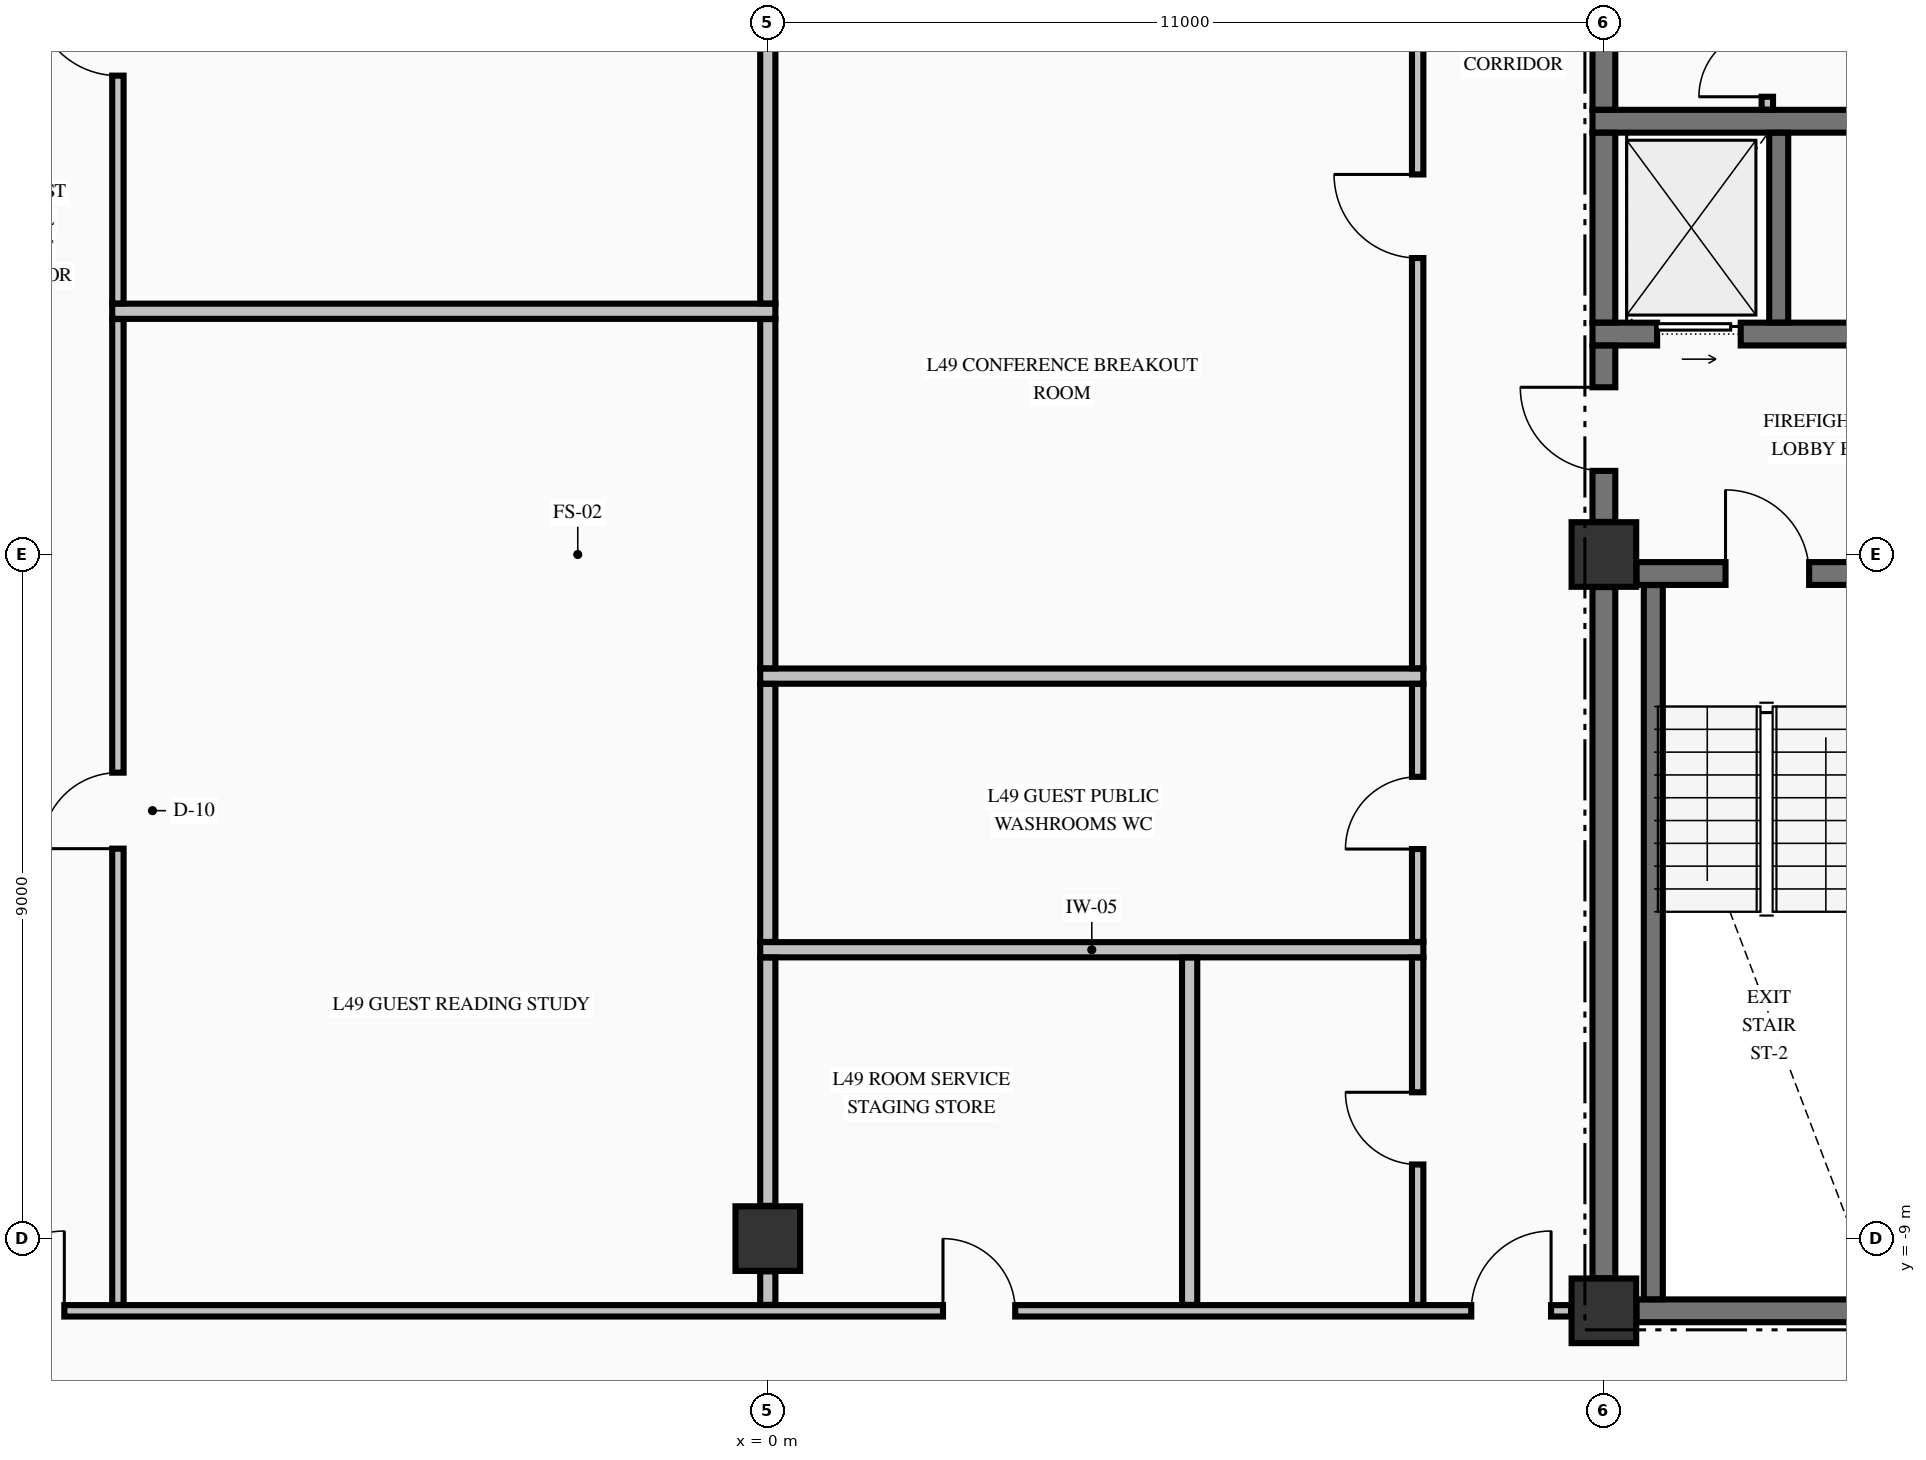
"""IFC4 building model, lengths in metres.
Left out: names, types, materials, properties, quantities, classifications, styles, units other than length and angle.
Written with IfcOpenShell. Run it as: python <this file> out.ifc"""

import sys

from ifc_helpers import new_model, si_unit, direction, frame, frame_2d, origin, origin_2d, place, context, subcontext, project, spatial, rectangle, extrude, element, fill, save


model = new_model("IFC4")
c1 = context("Model", 3, precision=1e-05, world=origin(), true_north=direction((0.0, 1.0)))
c2 = subcontext(c1, "Body", "Model", "MODEL_VIEW")
j1 = project(units=[si_unit("LENGTHUNIT", "METRE"), si_unit("PLANEANGLEUNIT", "RADIAN")], contexts=[c1])
p1 = place(None, origin())
s1 = spatial("IfcSite", under=j1, at=p1, CompositionType="ELEMENT")
p2 = place(p1, origin())
s2 = spatial("IfcBuilding", under=s1, at=p2, CompositionType="ELEMENT")
p3 = place(p2, frame((0.0, 0.0, 191.46)))
s3 = spatial("IfcBuildingStorey", under=s2, at=p3, CompositionType="ELEMENT", Elevation=191.46)
for number, where, z_axis, x_axis in (
    (1, (11.0, -9.95, -0.425), (0.0, 0.0, 1.0), (1.0, 0.0, 0.0)),
    (2, (11.0, 0.0, -0.425), (0.0, 0.0, 1.0), (1.0, 0.0, 0.0)),
    (3, (0.0, -9.0, -0.425), (0.0, 0.0, 1.0), (1.0, 0.0, 0.0)),
):
    element("IfcColumn", number, at=place(p3, frame(where, z_axis=z_axis, x_axis=x_axis)), inside=s3, PredefinedType="COLUMN", context=c2, shape_type="SweptSolid", body=[
        extrude(rectangle(XDim=0.85, YDim=0.85, at=origin_2d()), origin(), (0.0, 0.0, 1.0), 3.55),
    ])
p4 = place(p3, frame((11.429, -9.95, 0.0), z_axis=(0.0, 0.0, 1.0), x_axis=(1.0, 0.0, 0.0)))
e4 = element("IfcWall", 4, at=p4, inside=s3, PredefinedType="SHEAR", context=c2, shape_type="SweptSolid", body=[
    extrude(rectangle(XDim=3.271, YDim=0.3, at=frame_2d((1.635, 0.0))), origin(), (0.0, 0.0, 1.0), 3.125),
])
p5 = place(p3, frame((11.429, -0.25, 0.0), z_axis=(0.0, 0.0, 1.0), x_axis=(1.0, 0.0, 0.0)))
e5 = element("IfcWall", 5, at=p5, inside=s3, PredefinedType="SHEAR", context=c2, shape_type="SweptSolid", body=[
    extrude(rectangle(XDim=3.446, YDim=0.3, at=frame_2d((1.723, 0.0))), origin(), (0.0, 0.0, 1.0), 3.125),
])
p6 = place(p5, frame((1.171, 0.0, 0.0)))
e6 = element("IfcOpeningElement", 6, at=p6, cuts=e5, PredefinedType="OPENING", context=c2, shape_type="SweptSolid", body=[
    extrude(rectangle(XDim=1.1, YDim=2.15, at=frame_2d((0.55, 1.075))), frame((0.0, 0.16, 0.0), z_axis=(0.0, -1.0, 0.0), x_axis=(1.0, 0.0, 0.0)), (0.0, 0.0, 1.0), 0.32),
])
p7 = place(p3, frame((10.85, 2.9, 0.0), z_axis=(0.0, 0.0, 1.0), x_axis=(1.0, 0.0, 0.0)))
e7 = element("IfcWall", 7, at=p7, inside=s3, PredefinedType="SHEAR", context=c2, shape_type="SweptSolid", body=[
    extrude(rectangle(XDim=4.025, YDim=0.3, at=frame_2d((2.012, 0.0))), origin(), (0.0, 0.0, 1.0), 3.125),
])
p8 = place(p7, frame((0.85, 0.0, 0.0)))
e8 = element("IfcOpeningElement", 8, at=p8, cuts=e7, PredefinedType="OPENING", context=c2, shape_type="SweptSolid", body=[
    extrude(rectangle(XDim=1.1, YDim=2.2, at=frame_2d((0.55, 1.1))), frame((0.0, 0.16, 0.0), z_axis=(0.0, -1.0, 0.0), x_axis=(1.0, 0.0, 0.0)), (0.0, 0.0, 1.0), 0.32),
])
p9 = place(p3, frame((10.85, 5.7, 0.0), z_axis=(0.0, 0.0, 1.0), x_axis=(1.0, 0.0, 0.0)))
e9 = element("IfcWall", 9, at=p9, inside=s3, PredefinedType="SHEAR", context=c2, shape_type="SweptSolid", body=[
    extrude(rectangle(XDim=4.025, YDim=0.3, at=frame_2d((2.012, 0.0))), origin(), (0.0, 0.0, 1.0), 3.125),
])
p10 = place(p3, frame((-10.569, -9.95, 0.0), z_axis=(0.0, 0.0, 1.0), x_axis=(1.0, 0.0, 0.0)))
e10 = element("IfcWall", 10, at=p10, inside=s3, PredefinedType="PARTITIONING", context=c2, shape_type="SweptSolid", body=[
    extrude(rectangle(XDim=21.138, YDim=0.15, at=frame_2d((10.569, 0.0))), origin(), (0.0, 0.0, 1.0), 3.125),
])
p11 = place(p10, frame((0.264, 0.0, 0.0)))
e11 = element("IfcOpeningElement", 11, at=p11, cuts=e10, PredefinedType="OPENING", context=c2, shape_type="SweptSolid", body=[
    extrude(rectangle(XDim=1.05, YDim=2.15, at=frame_2d((0.525, 1.075))), frame((0.0, 0.085, 0.0), z_axis=(0.0, -1.0, 0.0), x_axis=(1.0, 0.0, 0.0)), (0.0, 0.0, 1.0), 0.17),
])
p12 = place(p10, frame((19.824, 0.0, 0.0)))
e12 = element("IfcOpeningElement", 12, at=p12, cuts=e10, PredefinedType="OPENING", context=c2, shape_type="SweptSolid", body=[
    extrude(rectangle(XDim=1.05, YDim=2.15, at=frame_2d((0.525, 1.075))), frame((0.0, 0.085, 0.0), z_axis=(0.0, -1.0, 0.0), x_axis=(1.0, 0.0, 0.0)), (0.0, 0.0, 1.0), 0.17),
])
p13 = place(p10, frame((12.874, 0.0, 0.0)))
e13 = element("IfcOpeningElement", 13, at=p13, cuts=e10, PredefinedType="OPENING", context=c2, shape_type="SweptSolid", body=[
    extrude(rectangle(XDim=0.95, YDim=2.15, at=frame_2d((0.475, 1.075))), frame((0.0, 0.085, 0.0), z_axis=(0.0, -1.0, 0.0), x_axis=(1.0, 0.0, 0.0)), (0.0, 0.0, 1.0), 0.17),
])
for number, where, z_axis, x_axis in (
    (14, (-0.1, -5.2, 0.0), (0.0, 0.0, 1.0), (1.0, 0.0, 0.0)),
    (15, (-0.1, -1.6, 0.0), (0.0, 0.0, 1.0), (1.0, 0.0, 0.0)),
    (16, (-8.625, 3.2, 0.0), (0.0, 0.0, 1.0), (1.0, 0.0, 0.0)),
):
    element("IfcWall", number, at=place(p3, frame(where, z_axis=z_axis, x_axis=x_axis)), inside=s3, PredefinedType="PARTITIONING", context=c2, shape_type="SweptSolid", body=[
        extrude(rectangle(XDim=8.725, YDim=0.2, at=frame_2d((4.363, 0.0))), origin(), (0.0, 0.0, 1.0), 3.125),
    ])
p14 = place(p3, frame((11.0, -9.521, 0.0), z_axis=(0.0, 0.0, 1.0), x_axis=(0.0, 1.0, 0.0)))
e17 = element("IfcWall", 17, at=p14, inside=s3, PredefinedType="SHEAR", context=c2, shape_type="SweptSolid", body=[
    extrude(rectangle(XDim=9.092, YDim=0.3, at=frame_2d((4.546, 0.0))), origin(), (0.0, 0.0, 1.0), 3.125),
])
p15 = place(p3, frame((11.0, 0.429, 0.0), z_axis=(0.0, 0.0, 1.0), x_axis=(0.0, 1.0, 0.0)))
e18 = element("IfcWall", 18, at=p15, inside=s3, PredefinedType="SHEAR", context=c2, shape_type="SweptSolid", body=[
    extrude(rectangle(XDim=2.319, YDim=0.3, at=frame_2d((1.16, 0.0))), origin(), (0.0, 0.0, 1.0), 3.125),
])
p16 = place(p15, frame((0.671, 0.0, 0.0)))
e19 = element("IfcOpeningElement", 19, at=p16, cuts=e18, PredefinedType="OPENING", context=c2, shape_type="SweptSolid", body=[
    extrude(rectangle(XDim=1.1, YDim=2.15, at=frame_2d((0.55, 1.075))), frame((0.0, 0.16, 0.0), z_axis=(0.0, -1.0, 0.0), x_axis=(1.0, 0.0, 0.0)), (0.0, 0.0, 1.0), 0.32),
])
p17 = place(p3, frame((11.0, 3.052, 0.0), z_axis=(0.0, 0.0, 1.0), x_axis=(0.0, 1.0, 0.0)))
e20 = element("IfcWall", 20, at=p17, inside=s3, PredefinedType="SHEAR", context=c2, shape_type="SweptSolid", body=[
    extrude(rectangle(XDim=2.496, YDim=0.3, at=frame_2d((1.248, 0.0))), origin(), (0.0, 0.0, 1.0), 3.125),
])
p18 = place(p3, frame((11.0, 5.852, 0.0), z_axis=(0.0, 0.0, 1.0), x_axis=(0.0, 1.0, 0.0)))
e21 = element("IfcWall", 21, at=p18, inside=s3, PredefinedType="SHEAR", context=c2, shape_type="SweptSolid", body=[
    extrude(rectangle(XDim=4.219, YDim=0.3, at=frame_2d((2.109, 0.0))), origin(), (0.0, 0.0, 1.0), 3.125),
])
p19 = place(p3, frame((11.65, -9.798, 0.0), z_axis=(0.0, 0.0, 1.0), x_axis=(0.0, 1.0, 0.0)))
e22 = element("IfcWall", 22, at=p19, inside=s3, PredefinedType="SOLIDWALL", context=c2, shape_type="SweptSolid", body=[
    extrude(rectangle(XDim=9.396, YDim=0.25, at=frame_2d((4.698, 0.0))), origin(), (0.0, 0.0, 1.0), 3.125),
])
p20 = place(p3, frame((13.3, 3.052, 0.0), z_axis=(0.0, 0.0, 1.0), x_axis=(0.0, 1.0, 0.0)))
e23 = element("IfcWall", 23, at=p20, inside=s3, PredefinedType="SOLIDWALL", context=c2, shape_type="SweptSolid", body=[
    extrude(rectangle(XDim=2.496, YDim=0.25, at=frame_2d((1.248, 0.0))), origin(), (0.0, 0.0, 1.0), 3.125),
])
p21 = place(p3, frame((-8.55, -9.872, 0.0), z_axis=(0.0, 0.0, 1.0), x_axis=(0.0, 1.0, 0.0)))
e24 = element("IfcWall", 24, at=p21, inside=s3, PredefinedType="PARTITIONING", context=c2, shape_type="SweptSolid", body=[
    extrude(rectangle(XDim=12.969, YDim=0.15, at=frame_2d((6.484, 0.0))), origin(), (0.0, 0.0, 1.0), 3.125),
])
p22 = place(p21, frame((6.002, 0.0, 0.0)))
e25 = element("IfcOpeningElement", 25, at=p22, cuts=e24, PredefinedType="OPENING", context=c2, shape_type="SweptSolid", body=[
    extrude(rectangle(XDim=1.0, YDim=2.15, at=frame_2d((0.5, 1.075))), frame((0.0, 0.085, 0.0), z_axis=(0.0, -1.0, 0.0), x_axis=(1.0, 0.0, 0.0)), (0.0, 0.0, 1.0), 0.17),
])
p23 = place(p3, frame((-8.55, 3.303, 0.0), z_axis=(0.0, 0.0, 1.0), x_axis=(0.0, 1.0, 0.0)))
e26 = element("IfcWall", 26, at=p23, inside=s3, PredefinedType="PARTITIONING", context=c2, shape_type="SweptSolid", body=[
    extrude(rectangle(XDim=7.119, YDim=0.15, at=frame_2d((3.56, 0.0))), origin(), (0.0, 0.0, 1.0), 3.125),
])
p24 = place(p23, frame((2.997, 0.0, 0.0)))
e27 = element("IfcOpeningElement", 27, at=p24, cuts=e26, PredefinedType="OPENING", context=c2, shape_type="SweptSolid", body=[
    extrude(rectangle(XDim=1.1, YDim=2.15, at=frame_2d((0.55, 1.075))), frame((0.0, 0.085, 0.0), z_axis=(0.0, -1.0, 0.0), x_axis=(1.0, 0.0, 0.0)), (0.0, 0.0, 1.0), 0.17),
])
p25 = place(p3, frame((0.0, -9.872, 0.0), z_axis=(0.0, 0.0, 1.0), x_axis=(0.0, 1.0, 0.0)))
e28 = element("IfcWall", 28, at=p25, inside=s3, PredefinedType="PARTITIONING", context=c2, shape_type="SweptSolid", body=[
    extrude(rectangle(XDim=0.441, YDim=0.2, at=frame_2d((0.221, 0.0))), origin(), (0.0, 0.0, 1.0), 2.317),
])
p26 = place(p3, frame((0.0, -8.569, 0.0), z_axis=(0.0, 0.0, 1.0), x_axis=(0.0, 1.0, 0.0)))
e29 = element("IfcWall", 29, at=p26, inside=s3, PredefinedType="PARTITIONING", context=c2, shape_type="SweptSolid", body=[
    extrude(rectangle(XDim=3.266, YDim=0.2, at=frame_2d((1.633, 0.0))), origin(), (0.0, 0.0, 1.0), 2.317),
])
p27 = place(p3, frame((0.0, -5.097, 0.0), z_axis=(0.0, 0.0, 1.0), x_axis=(0.0, 1.0, 0.0)))
e30 = element("IfcWall", 30, at=p27, inside=s3, PredefinedType="PARTITIONING", context=c2, shape_type="SweptSolid", body=[
    extrude(rectangle(XDim=3.394, YDim=0.2, at=frame_2d((1.697, 0.0))), origin(), (0.0, 0.0, 1.0), 2.317),
])
p28 = place(p3, frame((0.0, -1.497, 0.0), z_axis=(0.0, 0.0, 1.0), x_axis=(0.0, 1.0, 0.0)))
e31 = element("IfcWall", 31, at=p28, inside=s3, PredefinedType="PARTITIONING", context=c2, shape_type="SweptSolid", body=[
    extrude(rectangle(XDim=4.594, YDim=0.2, at=frame_2d((2.297, 0.0))), origin(), (0.0, 0.0, 1.0), 2.317),
])
p29 = place(p3, frame((0.0, 3.303, 0.0), z_axis=(0.0, 0.0, 1.0), x_axis=(0.0, 1.0, 0.0)))
e32 = element("IfcWall", 32, at=p29, inside=s3, PredefinedType="PARTITIONING", context=c2, shape_type="SweptSolid", body=[
    extrude(rectangle(XDim=5.266, YDim=0.2, at=frame_2d((2.633, 0.0))), origin(), (0.0, 0.0, 1.0), 2.317),
])
p30 = place(p3, frame((5.55, -9.872, 0.0), z_axis=(0.0, 0.0, 1.0), x_axis=(0.0, 1.0, 0.0)))
e33 = element("IfcWall", 33, at=p30, inside=s3, PredefinedType="PARTITIONING", context=c2, shape_type="SweptSolid", body=[
    extrude(rectangle(XDim=4.569, YDim=0.2, at=frame_2d((2.285, 0.0))), origin(), (0.0, 0.0, 1.0), 3.125),
])
p31 = place(p3, frame((8.55, -9.872, 0.0), z_axis=(0.0, 0.0, 1.0), x_axis=(0.0, 1.0, 0.0)))
e34 = element("IfcWall", 34, at=p31, inside=s3, PredefinedType="PARTITIONING", context=c2, shape_type="SweptSolid", body=[
    extrude(rectangle(XDim=4.569, YDim=0.15, at=frame_2d((2.285, 0.0))), origin(), (0.0, 0.0, 1.0), 3.125),
])
p32 = place(p31, frame((1.847, 0.0, 0.0)))
e35 = element("IfcOpeningElement", 35, at=p32, cuts=e34, PredefinedType="OPENING", context=c2, shape_type="SweptSolid", body=[
    extrude(rectangle(XDim=0.95, YDim=2.15, at=frame_2d((0.475, 1.075))), frame((0.0, 0.085, 0.0), z_axis=(0.0, -1.0, 0.0), x_axis=(1.0, 0.0, 0.0)), (0.0, 0.0, 1.0), 0.17),
])
p33 = place(p3, frame((8.55, -5.097, 0.0), z_axis=(0.0, 0.0, 1.0), x_axis=(0.0, 1.0, 0.0)))
e36 = element("IfcWall", 36, at=p33, inside=s3, PredefinedType="PARTITIONING", context=c2, shape_type="SweptSolid", body=[
    extrude(rectangle(XDim=3.394, YDim=0.15, at=frame_2d((1.697, 0.0))), origin(), (0.0, 0.0, 1.0), 3.125),
])
p34 = place(p33, frame((1.222, 0.0, 0.0)))
e37 = element("IfcOpeningElement", 37, at=p34, cuts=e36, PredefinedType="OPENING", context=c2, shape_type="SweptSolid", body=[
    extrude(rectangle(XDim=0.95, YDim=2.15, at=frame_2d((0.475, 1.075))), frame((0.0, 0.085, 0.0), z_axis=(0.0, -1.0, 0.0), x_axis=(1.0, 0.0, 0.0)), (0.0, 0.0, 1.0), 0.17),
])
p35 = place(p3, frame((8.55, -1.497, 0.0), z_axis=(0.0, 0.0, 1.0), x_axis=(0.0, 1.0, 0.0)))
e38 = element("IfcWall", 38, at=p35, inside=s3, PredefinedType="PARTITIONING", context=c2, shape_type="SweptSolid", body=[
    extrude(rectangle(XDim=11.919, YDim=0.15, at=frame_2d((5.959, 0.0))), origin(), (0.0, 0.0, 1.0), 3.125),
])
p36 = place(p35, frame((5.397, 0.0, 0.0)))
e39 = element("IfcOpeningElement", 39, at=p36, cuts=e38, PredefinedType="OPENING", context=c2, shape_type="SweptSolid", body=[
    extrude(rectangle(XDim=1.1, YDim=2.15, at=frame_2d((0.55, 1.075))), frame((0.0, 0.085, 0.0), z_axis=(0.0, -1.0, 0.0), x_axis=(1.0, 0.0, 0.0)), (0.0, 0.0, 1.0), 0.17),
])
p37 = place(p3, frame((13.15, 5.853, 0.0), z_axis=(0.0, 0.0, 1.0), x_axis=(0.0, 1.0, 0.0)))
e40 = element("IfcWall", 40, at=p37, inside=s3, PredefinedType="PARTITIONING", context=c2, shape_type="SweptSolid", body=[
    extrude(rectangle(XDim=1.219, YDim=0.15, at=frame_2d((0.609, 0.0))), origin(), (0.0, 0.0, 1.0), 3.125),
])
p38 = place(p37, frame((0.169, 0.0, 0.0)))
e41 = element("IfcOpeningElement", 41, at=p38, cuts=e40, PredefinedType="OPENING", context=c2, shape_type="SweptSolid", body=[
    extrude(rectangle(XDim=0.9, YDim=2.15, at=frame_2d((0.45, 1.075))), frame((0.0, 0.085, 0.0), z_axis=(0.0, -1.0, 0.0), x_axis=(1.0, 0.0, 0.0)), (0.0, 0.0, 1.0), 0.17),
])
p39 = place(p6, origin())
e42 = element("IfcDoor", 42, at=p39, inside=s3, OperationType="SINGLE_SWING_LEFT", PredefinedType="DOOR", context=c2, shape_type="SweptSolid", body=[
    extrude(rectangle(XDim=1.1, YDim=2.15, at=frame_2d((0.55, 1.075))), frame((0.0, 0.025, 0.0), z_axis=(0.0, -1.0, 0.0), x_axis=(1.0, 0.0, 0.0)), (0.0, 0.0, 1.0), 0.05),
])
fill(e6, e42)
p40 = place(p16, origin())
e43 = element("IfcDoor", 43, at=p40, inside=s3, OperationType="SINGLE_SWING_RIGHT", PredefinedType="DOOR", context=c2, shape_type="SweptSolid", body=[
    extrude(rectangle(XDim=1.1, YDim=2.15, at=frame_2d((0.55, 1.075))), frame((0.0, 0.025, 0.0), z_axis=(0.0, -1.0, 0.0), x_axis=(1.0, 0.0, 0.0)), (0.0, 0.0, 1.0), 0.05),
])
fill(e19, e43)
p41 = place(p8, origin())
e44 = element("IfcDoor", 44, at=p41, inside=s3, OperationType="SLIDING_TO_RIGHT", PredefinedType="DOOR", context=c2, shape_type="SweptSolid", body=[
    extrude(rectangle(XDim=1.1, YDim=2.2, at=frame_2d((0.55, 1.1))), frame((0.0, 0.025, 0.0), z_axis=(0.0, -1.0, 0.0), x_axis=(1.0, 0.0, 0.0)), (0.0, 0.0, 1.0), 0.05),
])
fill(e8, e44)
p42 = place(p38, origin())
e45 = element("IfcDoor", 45, at=p42, inside=s3, OperationType="SINGLE_SWING_LEFT", PredefinedType="DOOR", context=c2, shape_type="SweptSolid", body=[
    extrude(rectangle(XDim=0.9, YDim=2.15, at=frame_2d((0.45, 1.075))), frame((0.0, 0.025, 0.0), z_axis=(0.0, -1.0, 0.0), x_axis=(1.0, 0.0, 0.0)), (0.0, 0.0, 1.0), 0.05),
])
fill(e41, e45)
p43 = place(p11, origin())
e46 = element("IfcDoor", 46, at=p43, inside=s3, OperationType="SINGLE_SWING_RIGHT", PredefinedType="DOOR", context=c2, shape_type="SweptSolid", body=[
    extrude(rectangle(XDim=1.05, YDim=2.15, at=frame_2d((0.525, 1.075))), frame((0.0, 0.025, 0.0), z_axis=(0.0, -1.0, 0.0), x_axis=(1.0, 0.0, 0.0)), (0.0, 0.0, 1.0), 0.05),
])
fill(e11, e46)
p44 = place(p12, origin())
e47 = element("IfcDoor", 47, at=p44, inside=s3, OperationType="SINGLE_SWING_RIGHT", PredefinedType="DOOR", context=c2, shape_type="SweptSolid", body=[
    extrude(rectangle(XDim=1.05, YDim=2.15, at=frame_2d((0.525, 1.075))), frame((0.0, 0.025, 0.0), z_axis=(0.0, -1.0, 0.0), x_axis=(1.0, 0.0, 0.0)), (0.0, 0.0, 1.0), 0.05),
])
fill(e12, e47)
p45 = place(p24, origin())
e48 = element("IfcDoor", 48, at=p45, inside=s3, OperationType="SINGLE_SWING_RIGHT", PredefinedType="DOOR", context=c2, shape_type="SweptSolid", body=[
    extrude(rectangle(XDim=1.1, YDim=2.15, at=frame_2d((0.55, 1.075))), frame((0.0, 0.025, 0.0), z_axis=(0.0, -1.0, 0.0), x_axis=(1.0, 0.0, 0.0)), (0.0, 0.0, 1.0), 0.05),
])
fill(e27, e48)
p46 = place(p22, origin())
e49 = element("IfcDoor", 49, at=p46, inside=s3, OperationType="SINGLE_SWING_LEFT", PredefinedType="DOOR", context=c2, shape_type="SweptSolid", body=[
    extrude(rectangle(XDim=1.0, YDim=2.15, at=frame_2d((0.5, 1.075))), frame((0.0, 0.025, 0.0), z_axis=(0.0, -1.0, 0.0), x_axis=(1.0, 0.0, 0.0)), (0.0, 0.0, 1.0), 0.05),
])
fill(e25, e49)
p47 = place(p36, origin())
e50 = element("IfcDoor", 50, at=p47, inside=s3, OperationType="SINGLE_SWING_RIGHT", PredefinedType="DOOR", context=c2, shape_type="SweptSolid", body=[
    extrude(rectangle(XDim=1.1, YDim=2.15, at=frame_2d((0.55, 1.075))), frame((0.0, 0.025, 0.0), z_axis=(0.0, -1.0, 0.0), x_axis=(1.0, 0.0, 0.0)), (0.0, 0.0, 1.0), 0.05),
])
fill(e39, e50)
p48 = place(p34, origin())
e51 = element("IfcDoor", 51, at=p48, inside=s3, OperationType="SINGLE_SWING_LEFT", PredefinedType="DOOR", context=c2, shape_type="SweptSolid", body=[
    extrude(rectangle(XDim=0.95, YDim=2.15, at=frame_2d((0.475, 1.075))), frame((0.0, 0.025, 0.0), z_axis=(0.0, -1.0, 0.0), x_axis=(1.0, 0.0, 0.0)), (0.0, 0.0, 1.0), 0.05),
])
fill(e37, e51)
p49 = place(p32, origin())
e52 = element("IfcDoor", 52, at=p49, inside=s3, OperationType="SINGLE_SWING_RIGHT", PredefinedType="DOOR", context=c2, shape_type="SweptSolid", body=[
    extrude(rectangle(XDim=0.95, YDim=2.15, at=frame_2d((0.475, 1.075))), frame((0.0, 0.025, 0.0), z_axis=(0.0, -1.0, 0.0), x_axis=(1.0, 0.0, 0.0)), (0.0, 0.0, 1.0), 0.05),
])
fill(e35, e52)
p50 = place(p13, origin())
e53 = element("IfcDoor", 53, at=p50, inside=s3, OperationType="SINGLE_SWING_LEFT", PredefinedType="DOOR", context=c2, shape_type="SweptSolid", body=[
    extrude(rectangle(XDim=0.95, YDim=2.15, at=frame_2d((0.475, 1.075))), frame((0.0, 0.025, 0.0), z_axis=(0.0, -1.0, 0.0), x_axis=(1.0, 0.0, 0.0)), (0.0, 0.0, 1.0), 0.05),
])
fill(e13, e53)
save(model, sys.argv[1])
